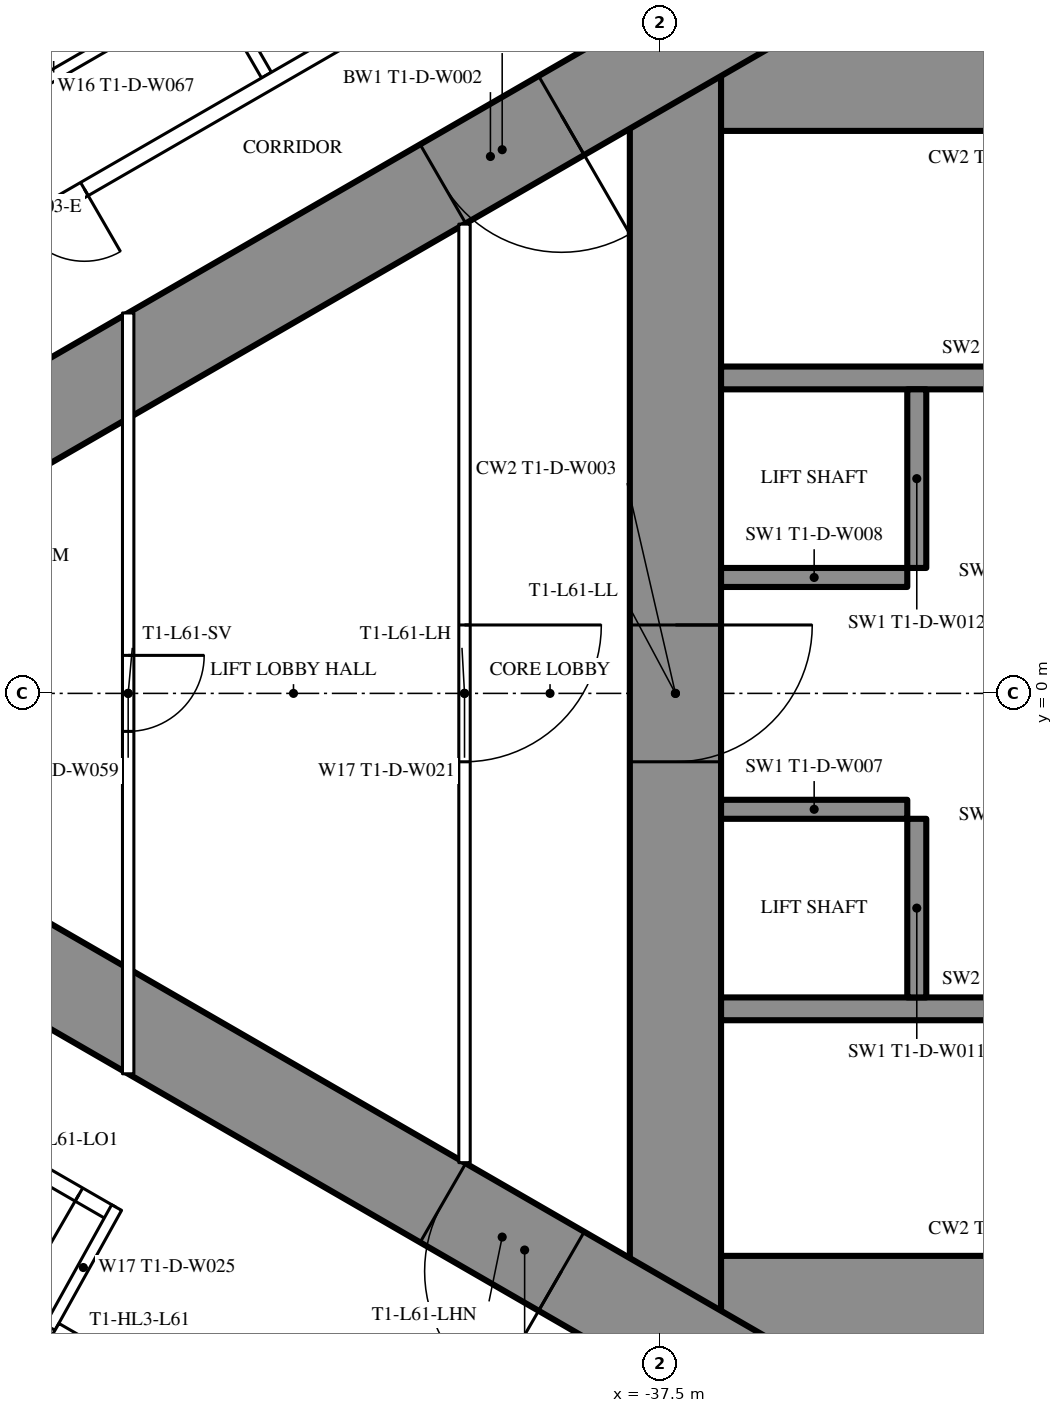
"""IFC4 building model, lengths in metres.
Left out: names, types, materials, properties, quantities, classifications, styles, units other than length and angle.
Written with IfcOpenShell. Run it as: python <this file> out.ifc"""

import sys

from ifc_helpers import new_model, si_unit, direction, frame, frame_2d, origin, place, context, subcontext, project, spatial, rectangle, extrude, element, fill, save


model = new_model("IFC4")
c1 = context("Model", 3, precision=1e-05, world=origin(), true_north=direction((0.0, 1.0)))
c2 = subcontext(c1, "Body", "Model", "MODEL_VIEW")
j1 = project(units=[si_unit("LENGTHUNIT", "METRE"), si_unit("PLANEANGLEUNIT", "RADIAN")], contexts=[c1])
p1 = place(None, origin())
s1 = spatial("IfcSite", under=j1, at=p1, CompositionType="ELEMENT")
p2 = place(p1, origin())
s2 = spatial("IfcBuilding", under=s1, at=p2, CompositionType="ELEMENT")
p3 = place(p2, frame((0.0, 0.0, 229.7)))
s3 = spatial("IfcBuildingStorey", under=s2, at=p3, CompositionType="ELEMENT", Elevation=229.7)
p4 = place(p3, frame((-37.3, 8.6, 0.0), z_axis=(0.0, 0.0, 1.0), x_axis=(0.0, -1.0, 0.0)))
e1 = element("IfcWall", 1, at=p4, inside=s3, PredefinedType="SHEAR", context=c2, shape_type="SweptSolid", body=[
    extrude(rectangle(XDim=17.2, YDim=1.2, at=frame_2d((8.6, 0.0))), origin(), (0.0, 0.0, 1.0), 3.6),
])
p5 = place(p4, frame((7.7, 0.0, 0.0)))
e2 = element("IfcOpeningElement", 2, at=p5, cuts=e1, PredefinedType="OPENING", context=c2, shape_type="SweptSolid", body=[
    extrude(rectangle(XDim=1.8, YDim=2.2, at=frame_2d((0.9, 1.1))), frame((0.0, 0.61, 0.0), z_axis=(0.0, -1.0, 0.0), x_axis=(1.0, 0.0, 0.0)), (0.0, 0.0, 1.0), 1.22),
])
p6 = place(p3, frame((-28.3, 8.0, 0.0), z_axis=(0.0, 0.0, 1.0), x_axis=(-1.0, 0.0, 0.0)))
e3 = element("IfcWall", 3, at=p6, inside=s3, PredefinedType="SHEAR", context=c2, shape_type="SweptSolid", body=[
    extrude(rectangle(XDim=8.4, YDim=1.2, at=frame_2d((4.2, 0.0))), origin(), (0.0, 0.0, 1.0), 3.6),
])
p7 = place(p6, frame((0.25, 0.0, 0.0)))
e4 = element("IfcOpeningElement", 4, at=p7, cuts=e3, PredefinedType="OPENING", context=c2, shape_type="SweptSolid", body=[
    extrude(rectangle(XDim=1.0, YDim=2.2, at=frame_2d((0.5, 1.1))), frame((0.0, 0.61, 0.0), z_axis=(0.0, -1.0, 0.0), x_axis=(1.0, 0.0, 0.0)), (0.0, 0.0, 1.0), 1.22),
])
p8 = place(p3, frame((-28.3, -8.0, 0.0), z_axis=(0.0, 0.0, 1.0), x_axis=(-1.0, 0.0, 0.0)))
e5 = element("IfcWall", 5, at=p8, inside=s3, PredefinedType="SHEAR", context=c2, shape_type="SweptSolid", body=[
    extrude(rectangle(XDim=8.4, YDim=1.2, at=frame_2d((4.2, 0.0))), origin(), (0.0, 0.0, 1.0), 3.6),
])
p9 = place(p8, frame((0.25, 0.0, 0.0)))
e6 = element("IfcOpeningElement", 6, at=p9, cuts=e5, PredefinedType="OPENING", context=c2, shape_type="SweptSolid", body=[
    extrude(rectangle(XDim=1.0, YDim=2.2, at=frame_2d((0.5, 1.1))), frame((0.0, 0.61, 0.0), z_axis=(0.0, -1.0, 0.0), x_axis=(1.0, 0.0, 0.0)), (0.0, 0.0, 1.0), 1.22),
])
for number, where, z_axis, x_axis in (
    (7, (-28.3, 4.15, 0.0), (0.0, 0.0, 1.0), (-1.0, 0.0, 0.0)),
    (8, (-28.3, -4.15, 0.0), (0.0, 0.0, 1.0), (-1.0, 0.0, 0.0)),
):
    element("IfcWall", number, at=place(p3, frame(where, z_axis=z_axis, x_axis=x_axis)), inside=s3, PredefinedType="SHEAR", context=c2, shape_type="SweptSolid", body=[
        extrude(rectangle(XDim=8.4, YDim=0.3, at=frame_2d((4.2, 0.0))), origin(), (0.0, 0.0, 1.0), 3.6),
    ])
p10 = place(p3, frame((-34.125, 4.0, 0.0), z_axis=(0.0, 0.0, 1.0), x_axis=(0.0, -1.0, 0.0)))
e9 = element("IfcWall", 9, at=p10, inside=s3, PredefinedType="SHEAR", context=c2, shape_type="SweptSolid", body=[
    extrude(rectangle(XDim=2.35, YDim=0.25, at=frame_2d((1.175, 0.0))), origin(), (0.0, 0.0, 1.0), 3.6),
])
p11 = place(p3, frame((-34.25, 1.525, 0.0), z_axis=(0.0, 0.0, 1.0), x_axis=(-1.0, 0.0, 0.0)))
e10 = element("IfcWall", 10, at=p11, inside=s3, PredefinedType="SHEAR", context=c2, shape_type="SweptSolid", body=[
    extrude(rectangle(XDim=2.45, YDim=0.25, at=frame_2d((1.225, 0.0))), origin(), (0.0, 0.0, 1.0), 3.6),
])
p12 = place(p3, frame((-34.125, -1.65, 0.0), z_axis=(0.0, 0.0, 1.0), x_axis=(0.0, -1.0, 0.0)))
e11 = element("IfcWall", 11, at=p12, inside=s3, PredefinedType="SHEAR", context=c2, shape_type="SweptSolid", body=[
    extrude(rectangle(XDim=2.35, YDim=0.25, at=frame_2d((1.175, 0.0))), origin(), (0.0, 0.0, 1.0), 3.6),
])
p13 = place(p3, frame((-34.25, -1.525, 0.0), z_axis=(0.0, 0.0, 1.0), x_axis=(-1.0, 0.0, 0.0)))
e12 = element("IfcWall", 12, at=p13, inside=s3, PredefinedType="SHEAR", context=c2, shape_type="SweptSolid", body=[
    extrude(rectangle(XDim=2.45, YDim=0.25, at=frame_2d((1.225, 0.0))), origin(), (0.0, 0.0, 1.0), 3.6),
])
p14 = place(p3, frame((-27.2, 14.3, 0.0), z_axis=(0.0, 0.0, 1.0), x_axis=(-0.866026593062, -0.499997940104, 0.0)))
e13 = element("IfcWall", 13, at=p14, inside=s3, PredefinedType="SHEAR", context=c2, shape_type="SweptSolid", body=[
    extrude(rectangle(XDim=28.946, YDim=1.2, at=frame_2d((14.473, 0.0))), origin(), (0.0, 0.0, 1.0), 3.6),
])
p15 = place(p14, frame((4.6, 0.0, 0.0)))
e14 = element("IfcOpeningElement", 14, at=p15, cuts=e13, PredefinedType="OPENING", context=c2, shape_type="SweptSolid", body=[
    extrude(rectangle(XDim=1.0, YDim=2.2, at=frame_2d((0.5, 1.1))), frame((0.0, 0.61, 0.0), z_axis=(0.0, -1.0, 0.0), x_axis=(1.0, 0.0, 0.0)), (0.0, 0.0, 1.0), 1.22),
])
p16 = place(p14, frame((13.395, 0.0, 0.0)))
e15 = element("IfcOpeningElement", 15, at=p16, cuts=e13, PredefinedType="OPENING", context=c2, shape_type="SweptSolid", body=[
    extrude(rectangle(XDim=1.8, YDim=2.2, at=frame_2d((0.9, 1.1))), frame((0.0, 0.61, 0.0), z_axis=(0.0, -1.0, 0.0), x_axis=(1.0, 0.0, 0.0)), (0.0, 0.0, 1.0), 1.22),
])
p17 = place(p3, frame((-27.2, -14.3, 0.0), z_axis=(0.0, 0.0, 1.0), x_axis=(-0.866024021859, 0.500002393557, 0.0)))
e16 = element("IfcWall", 16, at=p17, inside=s3, PredefinedType="SHEAR", context=c2, shape_type="SweptSolid", body=[
    extrude(rectangle(XDim=27.907, YDim=1.2, at=frame_2d((13.954, 0.0))), origin(), (0.0, 0.0, 1.0), 3.6),
])
p18 = place(p17, frame((4.6, 0.0, 0.0)))
e17 = element("IfcOpeningElement", 17, at=p18, cuts=e16, PredefinedType="OPENING", context=c2, shape_type="SweptSolid", body=[
    extrude(rectangle(XDim=1.0, YDim=2.2, at=frame_2d((0.5, 1.1))), frame((0.0, 0.61, 0.0), z_axis=(0.0, -1.0, 0.0), x_axis=(1.0, 0.0, 0.0)), (0.0, 0.0, 1.0), 1.22),
])
p19 = place(p17, frame((13.395, 0.0, 0.0)))
e18 = element("IfcOpeningElement", 18, at=p19, cuts=e16, PredefinedType="OPENING", context=c2, shape_type="SweptSolid", body=[
    extrude(rectangle(XDim=1.8, YDim=2.2, at=frame_2d((0.9, 1.1))), frame((0.0, 0.61, 0.0), z_axis=(0.0, -1.0, 0.0), x_axis=(1.0, 0.0, 0.0)), (0.0, 0.0, 1.0), 1.22),
])
p20 = place(p3, frame((-42.68, 8.134, 0.0), z_axis=(0.0, 0.0, 1.0), x_axis=(-0.499984479505, 0.866034364361, 0.0)))
e19 = element("IfcWall", 19, at=p20, inside=s3, PredefinedType="PARTITIONING", context=c2, shape_type="SweptSolid", body=[
    extrude(rectangle(XDim=5.995, YDim=0.15, at=frame_2d((2.998, 0.0))), origin(), (0.0, 0.0, 1.0), 2.45),
])
p21 = place(p3, frame((-44.715, -6.844, 0.0), z_axis=(0.0, 0.0, 1.0), x_axis=(-0.866025261224, 0.500000246922, 0.0)))
e20 = element("IfcWall", 20, at=p21, inside=s3, PredefinedType="PARTITIONING", context=c2, shape_type="SweptSolid", body=[
    extrude(rectangle(XDim=13.567, YDim=0.2, at=frame_2d((6.783, 0.0))), origin(), (0.0, 0.0, 1.0), 3.35),
])
p22 = place(p21, frame((6.266, 0.0, 0.0)))
e21 = element("IfcOpeningElement", 21, at=p22, cuts=e20, PredefinedType="OPENING", context=c2, shape_type="SweptSolid", body=[
    extrude(rectangle(XDim=0.95, YDim=2.2, at=frame_2d((0.475, 1.1))), frame((0.0, 0.11, 0.0), z_axis=(0.0, -1.0, 0.0), x_axis=(1.0, 0.0, 0.0)), (0.0, 0.0, 1.0), 0.22),
])
p23 = place(p21, frame((4.565, 0.0, 0.0)))
e22 = element("IfcOpeningElement", 22, at=p23, cuts=e20, PredefinedType="OPENING", context=c2, shape_type="SweptSolid", body=[
    extrude(rectangle(XDim=0.95, YDim=2.2, at=frame_2d((0.475, 1.1))), frame((0.0, 0.11, 0.0), z_axis=(0.0, -1.0, 0.0), x_axis=(1.0, 0.0, 0.0)), (0.0, 0.0, 1.0), 0.22),
])
p24 = place(p21, frame((0.5, 0.0, 0.0)))
e23 = element("IfcOpeningElement", 23, at=p24, cuts=e20, PredefinedType="OPENING", context=c2, shape_type="SweptSolid", body=[
    extrude(rectangle(XDim=0.967, YDim=2.2, at=frame_2d((0.483, 1.1))), frame((0.0, 0.11, 0.0), z_axis=(0.0, -1.0, 0.0), x_axis=(1.0, 0.0, 0.0)), (0.0, 0.0, 1.0), 0.22),
])
p25 = place(p3, frame((-44.652, -6.764, 0.0), z_axis=(0.0, 0.0, 1.0), x_axis=(-0.485424724123, -0.874278466629, 0.0)))
e24 = element("IfcWall", 24, at=p25, inside=s3, PredefinedType="PARTITIONING", context=c2, shape_type="SweptSolid", body=[
    extrude(rectangle(XDim=1.805, YDim=0.15, at=frame_2d((0.903, 0.0))), origin(), (0.0, 0.0, 1.0), 3.35),
])
p26 = place(p3, frame((-44.765, 8.546, 0.0), z_axis=(0.0, 0.0, 1.0), x_axis=(-0.86604923931, -0.499958713387, 0.0)))
e25 = element("IfcWall", 25, at=p26, inside=s3, PredefinedType="PARTITIONING", context=c2, shape_type="SweptSolid", body=[
    extrude(rectangle(XDim=2.475, YDim=0.15, at=frame_2d((1.237, 0.0))), origin(), (0.0, 0.0, 1.0), 3.35),
])
p27 = place(p3, frame((-28.737, 16.068, 0.0), z_axis=(0.0, 0.0, 1.0), x_axis=(-0.866023901326, -0.500002602325, 0.0)))
e26 = element("IfcWall", 26, at=p27, inside=s3, PredefinedType="PARTITIONING", context=c2, shape_type="SweptSolid", body=[
    extrude(rectangle(XDim=20.192, YDim=0.2, at=frame_2d((10.096, 0.0))), origin(), (0.0, 0.0, 1.0), 3.35),
])
p28 = place(p27, frame((1.08, 0.0, 0.0)))
e27 = element("IfcOpeningElement", 27, at=p28, cuts=e26, PredefinedType="OPENING", context=c2, shape_type="SweptSolid", body=[
    extrude(rectangle(XDim=1.8, YDim=2.04, at=frame_2d((0.9, 1.02))), frame((0.0, 0.11, 0.0), z_axis=(0.0, -1.0, 0.0), x_axis=(1.0, 0.0, 0.0)), (0.0, 0.0, 1.0), 0.22),
])
p29 = place(p27, frame((6.86, 0.0, 0.0)))
e28 = element("IfcOpeningElement", 28, at=p29, cuts=e26, PredefinedType="OPENING", context=c2, shape_type="SweptSolid", body=[
    extrude(rectangle(XDim=1.0, YDim=2.2, at=frame_2d((0.5, 1.1))), frame((0.0, 0.11, 0.0), z_axis=(0.0, -1.0, 0.0), x_axis=(1.0, 0.0, 0.0)), (0.0, 0.0, 1.0), 0.22),
])
p30 = place(p27, frame((18.867, 0.0, 0.0)))
e29 = element("IfcOpeningElement", 29, at=p30, cuts=e26, PredefinedType="OPENING", context=c2, shape_type="SweptSolid", body=[
    extrude(rectangle(XDim=0.95, YDim=2.2, at=frame_2d((0.475, 1.1))), frame((0.0, 0.11, 0.0), z_axis=(0.0, -1.0, 0.0), x_axis=(1.0, 0.0, 0.0)), (0.0, 0.0, 1.0), 0.22),
])
p31 = place(p3, frame((-40.075, 6.174, 0.0), z_axis=(0.0, 0.0, 1.0), x_axis=(0.0, -1.0, 0.0)))
e30 = element("IfcWall", 30, at=p31, inside=s3, PredefinedType="PARTITIONING", context=c2, shape_type="SweptSolid", body=[
    extrude(rectangle(XDim=12.348, YDim=0.15, at=frame_2d((6.174, 0.0))), origin(), (0.0, 0.0, 1.0), 3.35),
])
p32 = place(p31, frame((5.274, 0.0, 0.0)))
e31 = element("IfcOpeningElement", 31, at=p32, cuts=e30, PredefinedType="OPENING", context=c2, shape_type="SweptSolid", body=[
    extrude(rectangle(XDim=1.8, YDim=2.2, at=frame_2d((0.9, 1.1))), frame((0.0, 0.085, 0.0), z_axis=(0.0, -1.0, 0.0), x_axis=(1.0, 0.0, 0.0)), (0.0, 0.0, 1.0), 0.17),
])
p33 = place(p3, frame((-44.5, 5.005, 0.0), z_axis=(0.0, 0.0, 1.0), x_axis=(0.0, -1.0, 0.0)))
e32 = element("IfcWall", 32, at=p33, inside=s3, PredefinedType="PARTITIONING", context=c2, shape_type="SweptSolid", body=[
    extrude(rectangle(XDim=10.009, YDim=0.15, at=frame_2d((5.005, 0.0))), origin(), (0.0, 0.0, 1.0), 2.5),
])
p34 = place(p33, frame((4.505, 0.0, 0.0)))
e33 = element("IfcOpeningElement", 33, at=p34, cuts=e32, PredefinedType="OPENING", context=c2, shape_type="SweptSolid", body=[
    extrude(rectangle(XDim=1.0, YDim=2.2, at=frame_2d((0.5, 1.1))), frame((0.0, 0.085, 0.0), z_axis=(0.0, -1.0, 0.0), x_axis=(1.0, 0.0, 0.0)), (0.0, 0.0, 1.0), 0.17),
])
p35 = place(p3, frame((-39.758, -11.697, 0.0), z_axis=(0.0, 0.0, 1.0), x_axis=(-0.866024194504, 0.500002094529, 0.0)))
e34 = element("IfcWall", 34, at=p35, inside=s3, PredefinedType="PARTITIONING", context=c2, shape_type="SweptSolid", body=[
    extrude(rectangle(XDim=6.6, YDim=0.25, at=frame_2d((3.3, 0.0))), origin(), (0.0, 0.0, 1.0), 3.35),
])
p36 = place(p35, frame((0.75, 0.0, 0.0)))
e35 = element("IfcOpeningElement", 35, at=p36, cuts=e34, PredefinedType="OPENING", context=c2, shape_type="SweptSolid", body=[
    extrude(rectangle(XDim=1.1, YDim=2.2, at=frame_2d((0.55, 1.1))), frame((0.0, 0.135, 0.0), z_axis=(0.0, -1.0, 0.0), x_axis=(1.0, 0.0, 0.0)), (0.0, 0.0, 1.0), 0.27),
])
p37 = place(p35, frame((2.75, 0.0, 0.0)))
e36 = element("IfcOpeningElement", 36, at=p37, cuts=e34, PredefinedType="OPENING", context=c2, shape_type="SweptSolid", body=[
    extrude(rectangle(XDim=1.1, YDim=2.2, at=frame_2d((0.55, 1.1))), frame((0.0, 0.135, 0.0), z_axis=(0.0, -1.0, 0.0), x_axis=(1.0, 0.0, 0.0)), (0.0, 0.0, 1.0), 0.27),
])
p38 = place(p35, frame((4.75, 0.0, 0.0)))
e37 = element("IfcOpeningElement", 37, at=p38, cuts=e34, PredefinedType="OPENING", context=c2, shape_type="SweptSolid", body=[
    extrude(rectangle(XDim=1.1, YDim=2.2, at=frame_2d((0.55, 1.1))), frame((0.0, 0.135, 0.0), z_axis=(0.0, -1.0, 0.0), x_axis=(1.0, 0.0, 0.0)), (0.0, 0.0, 1.0), 0.27),
])
p39 = place(p30, origin())
e38 = element("IfcDoor", 38, at=p39, inside=s3, OperationType="SINGLE_SWING_LEFT", PredefinedType="DOOR", context=c2, shape_type="SweptSolid", body=[
    extrude(rectangle(XDim=0.95, YDim=2.2, at=frame_2d((0.475, 1.1))), frame((0.0, 0.025, 0.0), z_axis=(0.0, -1.0, 0.0), x_axis=(1.0, 0.0, 0.0)), (0.0, 0.0, 1.0), 0.05),
])
fill(e29, e38)
p40 = place(p24, origin())
e39 = element("IfcDoor", 39, at=p40, inside=s3, OperationType="SINGLE_SWING_LEFT", PredefinedType="DOOR", context=c2, shape_type="SweptSolid", body=[
    extrude(rectangle(XDim=0.967, YDim=2.2, at=frame_2d((0.483, 1.1))), frame((0.0, 0.025, 0.0), z_axis=(0.0, -1.0, 0.0), x_axis=(1.0, 0.0, 0.0)), (0.0, 0.0, 1.0), 0.05),
])
fill(e23, e39)
p41 = place(p32, origin())
e40 = element("IfcDoor", 40, at=p41, inside=s3, OperationType="DOUBLE_DOOR_SINGLE_SWING", PredefinedType="DOOR", context=c2, shape_type="SweptSolid", body=[
    extrude(rectangle(XDim=1.8, YDim=2.2, at=frame_2d((0.9, 1.1))), frame((0.0, 0.025, 0.0), z_axis=(0.0, -1.0, 0.0), x_axis=(1.0, 0.0, 0.0)), (0.0, 0.0, 1.0), 0.05),
])
fill(e31, e40)
p42 = place(p34, origin())
e41 = element("IfcDoor", 41, at=p42, inside=s3, OperationType="SINGLE_SWING_LEFT", PredefinedType="DOOR", context=c2, shape_type="SweptSolid", body=[
    extrude(rectangle(XDim=1.0, YDim=2.2, at=frame_2d((0.5, 1.1))), frame((0.0, 0.025, 0.0), z_axis=(0.0, -1.0, 0.0), x_axis=(1.0, 0.0, 0.0)), (0.0, 0.0, 1.0), 0.05),
])
fill(e33, e41)
p43 = place(p16, origin())
e42 = element("IfcDoor", 42, at=p43, inside=s3, OperationType="DOUBLE_DOOR_SINGLE_SWING", PredefinedType="DOOR", context=c2, shape_type="SweptSolid", body=[
    extrude(rectangle(XDim=1.8, YDim=2.2, at=frame_2d((0.9, 1.1))), frame((0.0, 0.025, 0.0), z_axis=(0.0, -1.0, 0.0), x_axis=(1.0, 0.0, 0.0)), (0.0, 0.0, 1.0), 0.05),
])
fill(e15, e42)
p44 = place(p19, origin())
e43 = element("IfcDoor", 43, at=p44, inside=s3, OperationType="DOUBLE_DOOR_SINGLE_SWING", PredefinedType="DOOR", context=c2, shape_type="SweptSolid", body=[
    extrude(rectangle(XDim=1.8, YDim=2.2, at=frame_2d((0.9, 1.1))), frame((0.0, 0.025, 0.0), z_axis=(0.0, -1.0, 0.0), x_axis=(1.0, 0.0, 0.0)), (0.0, 0.0, 1.0), 0.05),
])
fill(e18, e43)
p45 = place(p5, origin())
e44 = element("IfcDoor", 44, at=p45, inside=s3, OperationType="DOUBLE_DOOR_SINGLE_SWING", PredefinedType="DOOR", context=c2, shape_type="SweptSolid", body=[
    extrude(rectangle(XDim=1.8, YDim=2.2, at=frame_2d((0.9, 1.1))), frame((0.0, 0.025, 0.0), z_axis=(0.0, -1.0, 0.0), x_axis=(1.0, 0.0, 0.0)), (0.0, 0.0, 1.0), 0.05),
])
fill(e2, e44)
save(model, sys.argv[1])
